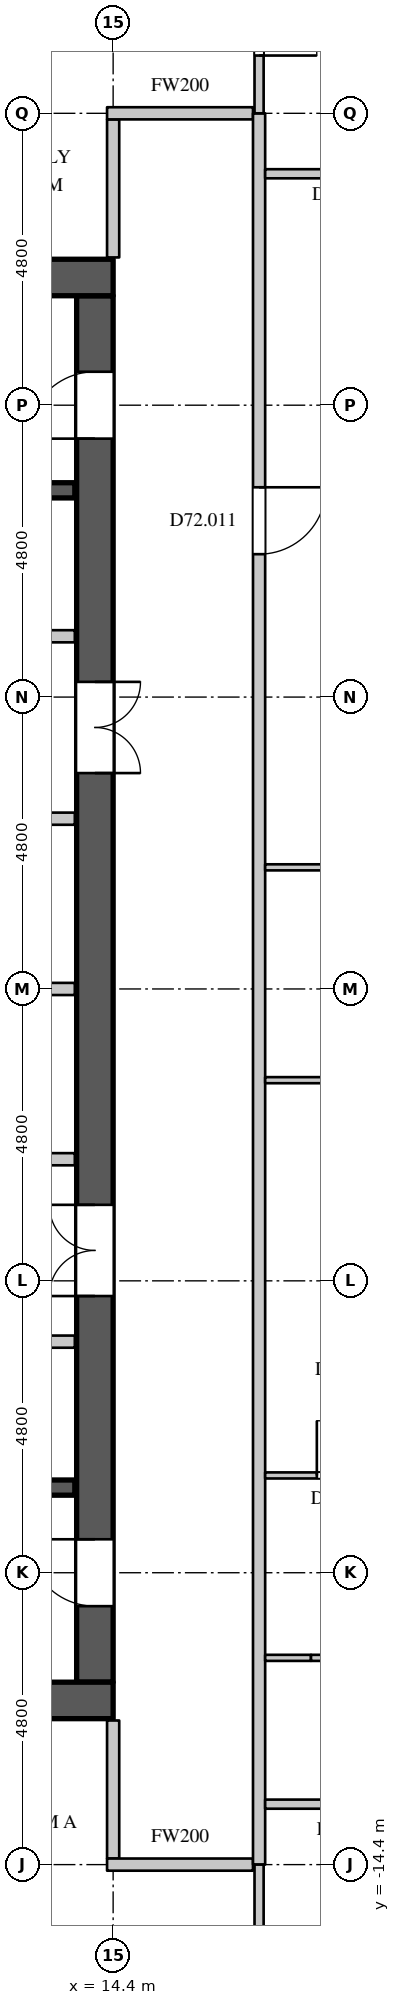
"""IFC4 building model, lengths in metres.
Left out: names, types, materials, properties, quantities, classifications, styles, units other than length and angle.
Written with IfcOpenShell. Run it as: python <this file> out.ifc"""

import sys

from ifc_helpers import new_model, si_unit, direction, frame, frame_2d, origin, place, context, subcontext, project, spatial, rectangle, extrude, element, fill, save


model = new_model("IFC4")
c1 = context("Model", 3, precision=1e-05, world=origin(), true_north=direction((0.0, 1.0)))
c2 = subcontext(c1, "Body", "Model", "MODEL_VIEW")
j1 = project(units=[si_unit("LENGTHUNIT", "METRE"), si_unit("PLANEANGLEUNIT", "RADIAN")], contexts=[c1])
p1 = place(None, origin())
s1 = spatial("IfcSite", under=j1, at=p1, CompositionType="ELEMENT")
p2 = place(p1, origin())
s2 = spatial("IfcBuilding", under=s1, at=p2, CompositionType="ELEMENT")
p3 = place(p2, frame((0.0, 0.0, 310.5)))
s3 = spatial("IfcBuildingStorey", under=s2, at=p3, CompositionType="ELEMENT", Elevation=310.5)
for number, where, z_axis, x_axis in (
    (1, (-14.4, 11.7, 0.0), (0.0, 0.0, 1.0), (1.0, 0.0, 0.0)),
    (2, (-14.4, -11.7, 0.0), (0.0, 0.0, 1.0), (1.0, 0.0, 0.0)),
):
    element("IfcWall", number, at=place(p3, frame(where, z_axis=z_axis, x_axis=x_axis)), inside=s3, PredefinedType="SHEAR", context=c2, shape_type="SweptSolid", body=[
        extrude(rectangle(XDim=28.8, YDim=0.6, at=frame_2d((14.4, 0.0))), origin(), (0.0, 0.0, 1.0), 4.2),
    ])
p4 = place(p3, frame((14.1, -11.4, 0.0), z_axis=(0.0, 0.0, 1.0), x_axis=(0.0, 1.0, 0.0)))
e3 = element("IfcWall", 3, at=p4, inside=s3, PredefinedType="SHEAR", context=c2, shape_type="SweptSolid", body=[
    extrude(rectangle(XDim=22.8, YDim=0.6, at=frame_2d((11.4, 0.0))), origin(), (0.0, 0.0, 1.0), 4.2),
])
p5 = place(p4, frame((20.45, 0.0, 0.0)))
e4 = element("IfcOpeningElement", 4, at=p5, cuts=e3, PredefinedType="OPENING", context=c2, shape_type="SweptSolid", body=[
    extrude(rectangle(XDim=1.1, YDim=2.2, at=frame_2d((0.55, 1.1))), frame((0.0, 0.31, 0.0), z_axis=(0.0, -1.0, 0.0), x_axis=(1.0, 0.0, 0.0)), (0.0, 0.0, 1.0), 0.62),
])
p6 = place(p4, frame((1.25, 0.0, 0.0)))
e5 = element("IfcOpeningElement", 5, at=p6, cuts=e3, PredefinedType="OPENING", context=c2, shape_type="SweptSolid", body=[
    extrude(rectangle(XDim=1.1, YDim=2.2, at=frame_2d((0.55, 1.1))), frame((0.0, 0.31, 0.0), z_axis=(0.0, -1.0, 0.0), x_axis=(1.0, 0.0, 0.0)), (0.0, 0.0, 1.0), 0.62),
])
p7 = place(p4, frame((14.95, 0.0, 0.0)))
e6 = element("IfcOpeningElement", 6, at=p7, cuts=e3, PredefinedType="OPENING", context=c2, shape_type="SweptSolid", body=[
    extrude(rectangle(XDim=1.5, YDim=2.4, at=frame_2d((0.75, 1.2))), frame((0.0, 0.31, 0.0), z_axis=(0.0, -1.0, 0.0), x_axis=(1.0, 0.0, 0.0)), (0.0, 0.0, 1.0), 0.62),
])
p8 = place(p4, frame((6.35, 0.0, 0.0)))
e7 = element("IfcOpeningElement", 7, at=p8, cuts=e3, PredefinedType="OPENING", context=c2, shape_type="SweptSolid", body=[
    extrude(rectangle(XDim=1.5, YDim=2.4, at=frame_2d((0.75, 1.2))), frame((0.0, 0.31, 0.0), z_axis=(0.0, -1.0, 0.0), x_axis=(1.0, 0.0, 0.0)), (0.0, 0.0, 1.0), 0.62),
])
p9 = place(p3, frame((14.4, -14.3, 0.0), z_axis=(0.0, 0.0, 1.0), x_axis=(0.0, 1.0, 0.0)))
e8 = element("IfcWall", 8, at=p9, inside=s3, PredefinedType="PARTITIONING", context=c2, shape_type="SweptSolid", body=[
    extrude(rectangle(XDim=2.27, YDim=0.2, at=frame_2d((1.135, 0.0))), origin(), (0.0, 0.0, 1.0), 3.9),
])
p10 = place(p3, frame((14.3, -14.4, 0.0), z_axis=(0.0, 0.0, 1.0), x_axis=(1.0, 0.0, 0.0)))
e9 = element("IfcWall", 9, at=p10, inside=s3, PredefinedType="PARTITIONING", context=c2, shape_type="SweptSolid", body=[
    extrude(rectangle(XDim=2.4, YDim=0.2, at=frame_2d((1.2, 0.0))), origin(), (0.0, 0.0, 1.0), 3.9),
])
p11 = place(p3, frame((14.4, 12.03, 0.0), z_axis=(0.0, 0.0, 1.0), x_axis=(0.0, 1.0, 0.0)))
e10 = element("IfcWall", 10, at=p11, inside=s3, PredefinedType="PARTITIONING", context=c2, shape_type="SweptSolid", body=[
    extrude(rectangle(XDim=2.27, YDim=0.2, at=frame_2d((1.135, 0.0))), origin(), (0.0, 0.0, 1.0), 3.9),
])
p12 = place(p3, frame((14.3, 14.4, 0.0), z_axis=(0.0, 0.0, 1.0), x_axis=(1.0, 0.0, 0.0)))
e11 = element("IfcWall", 11, at=p12, inside=s3, PredefinedType="PARTITIONING", context=c2, shape_type="SweptSolid", body=[
    extrude(rectangle(XDim=2.4, YDim=0.2, at=frame_2d((1.2, 0.0))), origin(), (0.0, 0.0, 1.0), 3.9),
])
p13 = place(p3, frame((16.8, -14.4, 0.0), z_axis=(0.0, 0.0, 1.0), x_axis=(0.0, 1.0, 0.0)))
e12 = element("IfcWall", 12, at=p13, inside=s3, PredefinedType="PARTITIONING", context=c2, shape_type="SweptSolid", body=[
    extrude(rectangle(XDim=28.8, YDim=0.2, at=frame_2d((14.4, 0.0))), origin(), (0.0, 0.0, 1.0), 3.9),
])
p14 = place(p13, frame((21.55, 0.0, 0.0)))
e13 = element("IfcOpeningElement", 13, at=p14, cuts=e12, PredefinedType="OPENING", context=c2, shape_type="SweptSolid", body=[
    extrude(rectangle(XDim=1.1, YDim=2.4, at=frame_2d((0.55, 1.2))), frame((0.0, 0.11, 0.0), z_axis=(0.0, -1.0, 0.0), x_axis=(1.0, 0.0, 0.0)), (0.0, 0.0, 1.0), 0.22),
])
p15 = place(p3, frame((16.8, -19.828, 0.0), z_axis=(0.0, 0.0, 1.0), x_axis=(0.0, 1.0, 0.0)))
e14 = element("IfcWall", 14, at=p15, inside=s3, PredefinedType="PARTITIONING", context=c2, shape_type="SweptSolid", body=[
    extrude(rectangle(XDim=5.428, YDim=0.15, at=frame_2d((2.714, 0.0))), origin(), (0.0, 0.0, 1.0), 3.9),
])
p16 = place(p15, frame((2.7, 0.0, 0.0)))
e15 = element("IfcOpeningElement", 15, at=p16, cuts=e14, PredefinedType="OPENING", context=c2, shape_type="SweptSolid", body=[
    extrude(rectangle(XDim=0.95, YDim=2.2, at=frame_2d((0.475, 1.1))), frame((0.0, 0.085, 0.0), z_axis=(0.0, -1.0, 0.0), x_axis=(1.0, 0.0, 0.0)), (0.0, 0.0, 1.0), 0.17),
])
p17 = place(p3, frame((16.9, -13.406, 0.0), z_axis=(0.0, 0.0, 1.0), x_axis=(1.0, 0.0, 0.0)))
e16 = element("IfcWall", 16, at=p17, inside=s3, PredefinedType="PARTITIONING", context=c2, shape_type="SweptSolid", body=[
    extrude(rectangle(XDim=8.324, YDim=0.15, at=frame_2d((4.162, 0.0))), origin(), (0.0, 0.0, 1.0), 3.9),
])
p18 = place(p17, frame((4.95, 0.0, 0.0)))
e17 = element("IfcOpeningElement", 17, at=p18, cuts=e16, PredefinedType="OPENING", context=c2, shape_type="SweptSolid", body=[
    extrude(rectangle(XDim=1.5, YDim=2.2, at=frame_2d((0.75, 1.1))), frame((0.0, 0.085, 0.0), z_axis=(0.0, -1.0, 0.0), x_axis=(1.0, 0.0, 0.0)), (0.0, 0.0, 1.0), 0.17),
])
p19 = place(p17, frame((0.95, 0.0, 0.0)))
e18 = element("IfcOpeningElement", 18, at=p19, cuts=e16, PredefinedType="OPENING", context=c2, shape_type="SweptSolid", body=[
    extrude(rectangle(XDim=0.9, YDim=2.2, at=frame_2d((0.45, 1.1))), frame((0.0, 0.085, 0.0), z_axis=(0.0, -1.0, 0.0), x_axis=(1.0, 0.0, 0.0)), (0.0, 0.0, 1.0), 0.17),
])
p20 = place(p3, frame((16.9, 13.406, 0.0), z_axis=(0.0, 0.0, 1.0), x_axis=(1.0, 0.0, 0.0)))
e19 = element("IfcWall", 19, at=p20, inside=s3, PredefinedType="PARTITIONING", context=c2, shape_type="SweptSolid", body=[
    extrude(rectangle(XDim=8.324, YDim=0.15, at=frame_2d((4.162, 0.0))), origin(), (0.0, 0.0, 1.0), 3.9),
])
p21 = place(p20, frame((1.2, 0.0, 0.0)))
e20 = element("IfcOpeningElement", 20, at=p21, cuts=e19, PredefinedType="OPENING", context=c2, shape_type="SweptSolid", body=[
    extrude(rectangle(XDim=0.95, YDim=2.2, at=frame_2d((0.475, 1.1))), frame((0.0, 0.085, 0.0), z_axis=(0.0, -1.0, 0.0), x_axis=(1.0, 0.0, 0.0)), (0.0, 0.0, 1.0), 0.17),
])
p22 = place(p3, frame((16.8, 14.4, 0.0), z_axis=(0.0, 0.0, 1.0), x_axis=(0.0, 1.0, 0.0)))
e21 = element("IfcWall", 21, at=p22, inside=s3, PredefinedType="PARTITIONING", context=c2, shape_type="SweptSolid", body=[
    extrude(rectangle(XDim=5.428, YDim=0.15, at=frame_2d((2.714, 0.0))), origin(), (0.0, 0.0, 1.0), 3.9),
])
p23 = place(p22, frame((0.95, 0.0, 0.0)))
e22 = element("IfcOpeningElement", 22, at=p23, cuts=e21, PredefinedType="OPENING", context=c2, shape_type="SweptSolid", body=[
    extrude(rectangle(XDim=0.95, YDim=2.2, at=frame_2d((0.475, 1.1))), frame((0.0, 0.085, 0.0), z_axis=(0.0, -1.0, 0.0), x_axis=(1.0, 0.0, 0.0)), (0.0, 0.0, 1.0), 0.17),
])
p24 = place(p3, frame((3.82, 5.8, 0.0), z_axis=(0.0, 0.0, 1.0), x_axis=(1.0, 0.0, 0.0)))
e23 = element("IfcWall", 23, at=p24, inside=s3, PredefinedType="PARTITIONING", context=c2, shape_type="SweptSolid", body=[
    extrude(rectangle(XDim=9.95, YDim=0.2, at=frame_2d((4.975, 0.0))), origin(), (0.0, 0.0, 1.0), 3.9),
])
p25 = place(p24, frame((4.5, 0.0, 0.0)))
e24 = element("IfcOpeningElement", 24, at=p25, cuts=e23, PredefinedType="OPENING", context=c2, shape_type="SweptSolid", body=[
    extrude(rectangle(XDim=0.9, YDim=2.2, at=frame_2d((0.45, 1.1))), frame((0.0, 0.11, 0.0), z_axis=(0.0, -1.0, 0.0), x_axis=(1.0, 0.0, 0.0)), (0.0, 0.0, 1.0), 0.22),
])
p26 = place(p3, frame((7.8, -2.8, 0.0), z_axis=(0.0, 0.0, 1.0), x_axis=(1.0, 0.0, 0.0)))
e25 = element("IfcWall", 25, at=p26, inside=s3, PredefinedType="PARTITIONING", context=c2, shape_type="SweptSolid", body=[
    extrude(rectangle(XDim=5.97, YDim=0.2, at=frame_2d((2.985, 0.0))), origin(), (0.0, 0.0, 1.0), 3.9),
])
p27 = place(p26, frame((2.55, 0.0, 0.0)))
e26 = element("IfcOpeningElement", 26, at=p27, cuts=e25, PredefinedType="OPENING", context=c2, shape_type="SweptSolid", body=[
    extrude(rectangle(XDim=0.9, YDim=2.2, at=frame_2d((0.45, 1.1))), frame((0.0, 0.11, 0.0), z_axis=(0.0, -1.0, 0.0), x_axis=(1.0, 0.0, 0.0)), (0.0, 0.0, 1.0), 0.22),
])
p28 = place(p3, frame((7.8, 0.0, 0.0), z_axis=(0.0, 0.0, 1.0), x_axis=(1.0, 0.0, 0.0)))
e27 = element("IfcWall", 27, at=p28, inside=s3, PredefinedType="PARTITIONING", context=c2, shape_type="SweptSolid", body=[
    extrude(rectangle(XDim=5.97, YDim=0.2, at=frame_2d((2.985, 0.0))), origin(), (0.0, 0.0, 1.0), 3.9),
])
p29 = place(p3, frame((8.42, -5.8, 0.0), z_axis=(0.0, 0.0, 1.0), x_axis=(1.0, 0.0, 0.0)))
e28 = element("IfcWall", 28, at=p29, inside=s3, PredefinedType="PARTITIONING", context=c2, shape_type="SweptSolid", body=[
    extrude(rectangle(XDim=5.35, YDim=0.2, at=frame_2d((2.675, 0.0))), origin(), (0.0, 0.0, 1.0), 3.9),
])
p30 = place(p29, frame((2.25, 0.0, 0.0)))
e29 = element("IfcOpeningElement", 29, at=p30, cuts=e28, PredefinedType="OPENING", context=c2, shape_type="SweptSolid", body=[
    extrude(rectangle(XDim=0.9, YDim=2.2, at=frame_2d((0.45, 1.1))), frame((0.0, 0.11, 0.0), z_axis=(0.0, -1.0, 0.0), x_axis=(1.0, 0.0, 0.0)), (0.0, 0.0, 1.0), 0.22),
])
p31 = place(p3, frame((10.42, 2.8, 0.0), z_axis=(0.0, 0.0, 1.0), x_axis=(1.0, 0.0, 0.0)))
e30 = element("IfcWall", 30, at=p31, inside=s3, PredefinedType="PARTITIONING", context=c2, shape_type="SweptSolid", body=[
    extrude(rectangle(XDim=3.35, YDim=0.2, at=frame_2d((1.675, 0.0))), origin(), (0.0, 0.0, 1.0), 3.9),
])
p32 = place(p31, frame((1.35, 0.0, 0.0)))
e31 = element("IfcOpeningElement", 31, at=p32, cuts=e30, PredefinedType="OPENING", context=c2, shape_type="SweptSolid", body=[
    extrude(rectangle(XDim=0.6, YDim=2.0, at=frame_2d((0.3, 1.0))), frame((0.0, 0.11, 0.0), z_axis=(0.0, -1.0, 0.0), x_axis=(1.0, 0.0, 0.0)), (0.0, 0.0, 1.0), 0.22),
])
for number, where, z_axis, x_axis in (
    (32, (5.275, -8.2, 0.0), (0.0, 0.0, 1.0), (1.0, 0.0, 0.0)),
    (33, (5.275, 8.2, 0.0), (0.0, 0.0, 1.0), (1.0, 0.0, 0.0)),
):
    element("IfcWall", number, at=place(p3, frame(where, z_axis=z_axis, x_axis=x_axis)), inside=s3, PredefinedType="SHEAR", context=c2, shape_type="SweptSolid", body=[
        extrude(rectangle(XDim=8.495, YDim=0.25, at=frame_2d((4.248, 0.0))), origin(), (0.0, 0.0, 1.0), 3.9),
    ])
p33 = place(p3, frame((16.9, -11.0, 0.0), z_axis=(0.0, 0.0, 1.0), x_axis=(1.0, 0.0, 0.0)))
e34 = element("IfcWall", 34, at=p33, inside=s3, PredefinedType="PARTITIONING", context=c2, shape_type="SweptSolid", body=[
    extrude(rectangle(XDim=0.754, YDim=0.1, at=frame_2d((0.377, 0.0))), origin(), (0.0, 0.0, 1.0), 3.3),
])
p34 = place(p3, frame((17.654, -11.0, 0.0), z_axis=(0.0, 0.0, 1.0), x_axis=(1.0, 0.0, 0.0)))
e35 = element("IfcWall", 35, at=p34, inside=s3, PredefinedType="PARTITIONING", context=c2, shape_type="SweptSolid", body=[
    extrude(rectangle(XDim=1.921, YDim=0.1, at=frame_2d((0.96, 0.0))), origin(), (0.0, 0.0, 1.0), 3.9),
])
p35 = place(p3, frame((16.9, -8.0, 0.0), z_axis=(0.0, 0.0, 1.0), x_axis=(1.0, 0.0, 0.0)))
e36 = element("IfcWall", 36, at=p35, inside=s3, PredefinedType="PARTITIONING", context=c2, shape_type="SweptSolid", body=[
    extrude(rectangle(XDim=2.675, YDim=0.1, at=frame_2d((1.337, 0.0))), origin(), (0.0, 0.0, 1.0), 3.9),
])
p36 = place(p35, frame((0.85, 0.0, 0.0)))
e37 = element("IfcOpeningElement", 37, at=p36, cuts=e36, PredefinedType="OPENING", context=c2, shape_type="SweptSolid", body=[
    extrude(rectangle(XDim=0.9, YDim=2.2, at=frame_2d((0.45, 1.1))), frame((0.0, 0.06, 0.0), z_axis=(0.0, -1.0, 0.0), x_axis=(1.0, 0.0, 0.0)), (0.0, 0.0, 1.0), 0.12),
])
p37 = place(p3, frame((16.9, -1.5, 0.0), z_axis=(0.0, 0.0, 1.0), x_axis=(1.0, 0.0, 0.0)))
e38 = element("IfcWall", 38, at=p37, inside=s3, PredefinedType="PARTITIONING", context=c2, shape_type="SweptSolid", body=[
    extrude(rectangle(XDim=3.625, YDim=0.1, at=frame_2d((1.812, 0.0))), origin(), (0.0, 0.0, 1.0), 3.9),
])
p38 = place(p3, frame((16.9, 2.0, 0.0), z_axis=(0.0, 0.0, 1.0), x_axis=(1.0, 0.0, 0.0)))
e39 = element("IfcWall", 39, at=p38, inside=s3, PredefinedType="PARTITIONING", context=c2, shape_type="SweptSolid", body=[
    extrude(rectangle(XDim=3.65, YDim=0.1, at=frame_2d((1.825, 0.0))), origin(), (0.0, 0.0, 1.0), 3.9),
])
p39 = place(p38, frame((1.35, 0.0, 0.0)))
e40 = element("IfcOpeningElement", 40, at=p39, cuts=e39, PredefinedType="OPENING", context=c2, shape_type="SweptSolid", body=[
    extrude(rectangle(XDim=0.9, YDim=2.2, at=frame_2d((0.45, 1.1))), frame((0.0, 0.06, 0.0), z_axis=(0.0, -1.0, 0.0), x_axis=(1.0, 0.0, 0.0)), (0.0, 0.0, 1.0), 0.12),
])
p40 = place(p5, origin())
e41 = element("IfcDoor", 41, at=p40, inside=s3, OperationType="SINGLE_SWING_LEFT", PredefinedType="DOOR", context=c2, shape_type="SweptSolid", body=[
    extrude(rectangle(XDim=1.1, YDim=2.2, at=frame_2d((0.55, 1.1))), frame((0.0, 0.295, 0.0), z_axis=(0.0, -1.0, 0.0), x_axis=(1.0, 0.0, 0.0)), (0.0, 0.0, 1.0), 0.05),
])
fill(e4, e41)
p41 = place(p6, origin())
e42 = element("IfcDoor", 42, at=p41, inside=s3, OperationType="SINGLE_SWING_RIGHT", PredefinedType="DOOR", context=c2, shape_type="SweptSolid", body=[
    extrude(rectangle(XDim=1.1, YDim=2.2, at=frame_2d((0.55, 1.1))), frame((0.0, 0.295, 0.0), z_axis=(0.0, -1.0, 0.0), x_axis=(1.0, 0.0, 0.0)), (0.0, 0.0, 1.0), 0.05),
])
fill(e5, e42)
p42 = place(p7, origin())
e43 = element("IfcDoor", 43, at=p42, inside=s3, OperationType="DOUBLE_DOOR_SINGLE_SWING", PredefinedType="DOOR", context=c2, shape_type="SweptSolid", body=[
    extrude(rectangle(XDim=1.5, YDim=2.4, at=frame_2d((0.75, 1.2))), frame((0.0, -0.245, 0.0), z_axis=(0.0, -1.0, 0.0), x_axis=(1.0, 0.0, 0.0)), (0.0, 0.0, 1.0), 0.05),
])
fill(e6, e43)
p43 = place(p8, origin())
e44 = element("IfcDoor", 44, at=p43, inside=s3, OperationType="DOUBLE_DOOR_SINGLE_SWING", PredefinedType="DOOR", context=c2, shape_type="SweptSolid", body=[
    extrude(rectangle(XDim=1.5, YDim=2.4, at=frame_2d((0.75, 1.2))), frame((0.0, 0.295, 0.0), z_axis=(0.0, -1.0, 0.0), x_axis=(1.0, 0.0, 0.0)), (0.0, 0.0, 1.0), 0.05),
])
fill(e7, e44)
p44 = place(p14, origin())
e45 = element("IfcDoor", 45, at=p44, inside=s3, OperationType="SINGLE_SWING_LEFT", PredefinedType="DOOR", context=c2, shape_type="SweptSolid", body=[
    extrude(rectangle(XDim=1.1, YDim=2.4, at=frame_2d((0.55, 1.2))), frame((0.0, 0.025, 0.0), z_axis=(0.0, -1.0, 0.0), x_axis=(1.0, 0.0, 0.0)), (0.0, 0.0, 1.0), 0.05),
])
fill(e13, e45)
p45 = place(p23, origin())
e46 = element("IfcDoor", 46, at=p45, inside=s3, OperationType="SINGLE_SWING_RIGHT", PredefinedType="DOOR", context=c2, shape_type="SweptSolid", body=[
    extrude(rectangle(XDim=0.95, YDim=2.2, at=frame_2d((0.475, 1.1))), frame((0.0, 0.025, 0.0), z_axis=(0.0, -1.0, 0.0), x_axis=(1.0, 0.0, 0.0)), (0.0, 0.0, 1.0), 0.05),
])
fill(e22, e46)
p46 = place(p36, origin())
e47 = element("IfcDoor", 47, at=p46, inside=s3, OperationType="SINGLE_SWING_LEFT", PredefinedType="DOOR", context=c2, shape_type="SweptSolid", body=[
    extrude(rectangle(XDim=0.9, YDim=2.2, at=frame_2d((0.45, 1.1))), frame((0.0, 0.025, 0.0), z_axis=(0.0, -1.0, 0.0), x_axis=(1.0, 0.0, 0.0)), (0.0, 0.0, 1.0), 0.05),
])
fill(e37, e47)
save(model, sys.argv[1])
